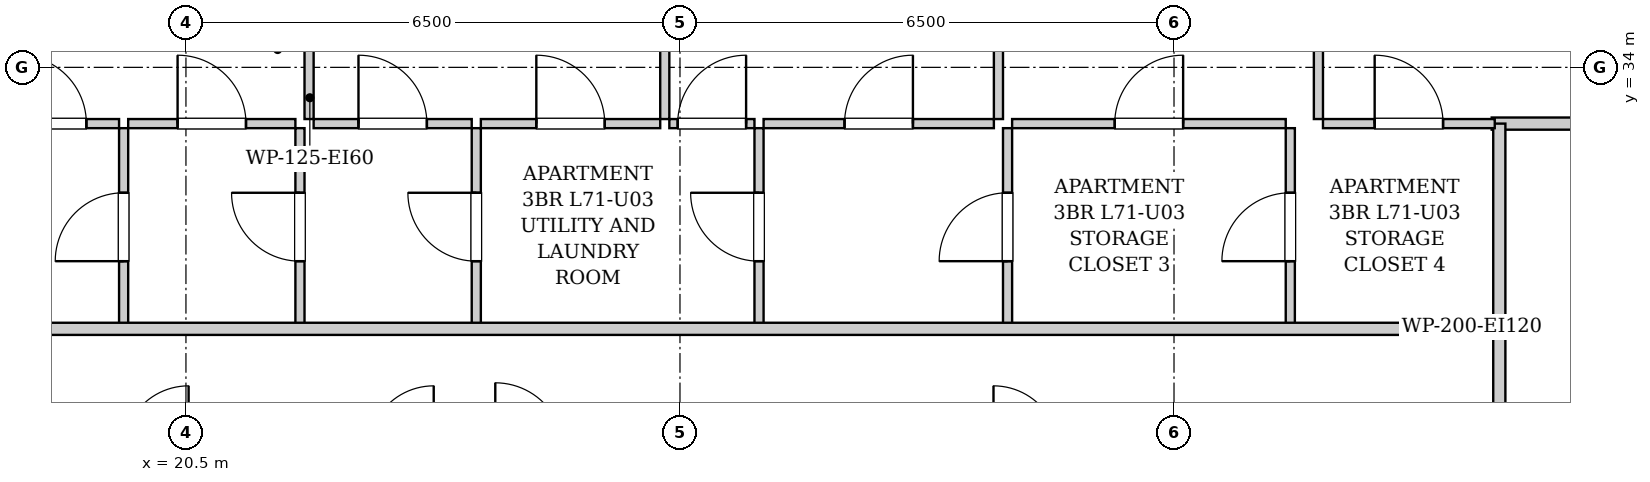
"""IFC4 building model, lengths in metres.
Left out: names, types, materials, properties, quantities, classifications, styles, units other than length and angle.
Written with IfcOpenShell. Run it as: python <this file> out.ifc"""

import sys

from ifc_helpers import new_model, si_unit, direction, frame, frame_2d, origin, place, context, subcontext, project, spatial, rectangle, extrude, element, fill, save


model = new_model("IFC4")
c1 = context("Model", 3, precision=1e-05, world=origin(), true_north=direction((0.0, 1.0)))
c2 = subcontext(c1, "Body", "Model", "MODEL_VIEW")
j1 = project(units=[si_unit("LENGTHUNIT", "METRE"), si_unit("PLANEANGLEUNIT", "RADIAN")], contexts=[c1])
p1 = place(None, origin())
s1 = spatial("IfcSite", under=j1, at=p1, CompositionType="ELEMENT")
p2 = place(p1, origin())
s2 = spatial("IfcBuilding", under=s1, at=p2, CompositionType="ELEMENT")
p3 = place(p2, frame((0.0, 0.0, 244.5)))
s3 = spatial("IfcBuildingStorey", under=s2, at=p3, CompositionType="ELEMENT", Elevation=244.5)
p4 = place(p3, frame((37.78, 28.98, 0.0), z_axis=(0.0, 0.0, 1.0), x_axis=(0.0, 1.0, 0.0)))
e1 = element("IfcWall", 1, at=p4, inside=s3, PredefinedType="PARTITIONING", context=c2, shape_type="SweptSolid", body=[
    extrude(rectangle(XDim=1.58, YDim=0.16, at=frame_2d((0.79, 0.0))), origin(), (0.0, 0.0, 1.0), 3.14),
])
p5 = place(p3, frame((37.68, 33.26, 0.0), z_axis=(0.0, 0.0, 1.0), x_axis=(1.0, 0.0, 0.0)))
e2 = element("IfcWall", 2, at=p5, inside=s3, PredefinedType="PARTITIONING", context=c2, shape_type="SweptSolid", body=[
    extrude(rectangle(XDim=2.34, YDim=0.16, at=frame_2d((1.17, 0.0))), origin(), (0.0, 0.0, 1.0), 3.14),
])
p6 = place(p3, frame((37.78, 30.6, 0.0), z_axis=(0.0, 0.0, 1.0), x_axis=(0.0, 1.0, 0.0)))
e3 = element("IfcWall", 3, at=p6, inside=s3, PredefinedType="PARTITIONING", context=c2, shape_type="SweptSolid", body=[
    extrude(rectangle(XDim=2.66, YDim=0.16, at=frame_2d((1.33, 0.0))), origin(), (0.0, 0.0, 1.0), 3.14),
])
p7 = place(p3, frame((19.68, 30.6, 0.0), z_axis=(0.0, 0.0, 1.0), x_axis=(0.0, 1.0, 0.0)))
e4 = element("IfcWall", 4, at=p7, inside=s3, PredefinedType="PARTITIONING", context=c2, shape_type="SweptSolid", body=[
    extrude(rectangle(XDim=2.6, YDim=0.12, at=frame_2d((1.3, 0.0))), origin(), (0.0, 0.0, 1.0), 3.14),
])
p8 = place(p7, frame((0.85, 0.0, 0.0)))
e5 = element("IfcOpeningElement", 5, at=p8, cuts=e4, PredefinedType="OPENING", context=c2, shape_type="SweptSolid", body=[
    extrude(rectangle(XDim=0.9, YDim=2.05, at=frame_2d((0.45, 1.025))), frame((0.0, 0.07, 0.0), z_axis=(0.0, -1.0, 0.0), x_axis=(1.0, 0.0, 0.0)), (0.0, 0.0, 1.0), 0.14),
])
p9 = place(p3, frame((17.86, 33.26, 0.0), z_axis=(0.0, 0.0, 1.0), x_axis=(1.0, 0.0, 0.0)))
e6 = element("IfcWall", 6, at=p9, inside=s3, PredefinedType="PARTITIONING", context=c2, shape_type="SweptSolid", body=[
    extrude(rectangle(XDim=1.76, YDim=0.12, at=frame_2d((0.88, 0.0))), origin(), (0.0, 0.0, 1.0), 3.14),
])
p10 = place(p9, frame((0.43, 0.0, 0.0)))
e7 = element("IfcOpeningElement", 7, at=p10, cuts=e6, PredefinedType="OPENING", context=c2, shape_type="SweptSolid", body=[
    extrude(rectangle(XDim=0.9, YDim=2.05, at=frame_2d((0.45, 1.025))), frame((0.0, 0.07, 0.0), z_axis=(0.0, -1.0, 0.0), x_axis=(1.0, 0.0, 0.0)), (0.0, 0.0, 1.0), 0.14),
])
p11 = place(p3, frame((22.0, 30.6, 0.0), z_axis=(0.0, 0.0, 1.0), x_axis=(0.0, 1.0, 0.0)))
e8 = element("IfcWall", 8, at=p11, inside=s3, PredefinedType="PARTITIONING", context=c2, shape_type="SweptSolid", body=[
    extrude(rectangle(XDim=2.6, YDim=0.12, at=frame_2d((1.3, 0.0))), origin(), (0.0, 0.0, 1.0), 3.14),
])
p12 = place(p11, frame((0.85, 0.0, 0.0)))
e9 = element("IfcOpeningElement", 9, at=p12, cuts=e8, PredefinedType="OPENING", context=c2, shape_type="SweptSolid", body=[
    extrude(rectangle(XDim=0.9, YDim=2.05, at=frame_2d((0.45, 1.025))), frame((0.0, 0.07, 0.0), z_axis=(0.0, -1.0, 0.0), x_axis=(1.0, 0.0, 0.0)), (0.0, 0.0, 1.0), 0.14),
])
p13 = place(p3, frame((19.74, 33.26, 0.0), z_axis=(0.0, 0.0, 1.0), x_axis=(1.0, 0.0, 0.0)))
e10 = element("IfcWall", 10, at=p13, inside=s3, PredefinedType="PARTITIONING", context=c2, shape_type="SweptSolid", body=[
    extrude(rectangle(XDim=2.2, YDim=0.12, at=frame_2d((1.1, 0.0))), origin(), (0.0, 0.0, 1.0), 3.14),
])
p14 = place(p13, frame((0.65, 0.0, 0.0)))
e11 = element("IfcOpeningElement", 11, at=p14, cuts=e10, PredefinedType="OPENING", context=c2, shape_type="SweptSolid", body=[
    extrude(rectangle(XDim=0.9, YDim=2.05, at=frame_2d((0.45, 1.025))), frame((0.0, 0.07, 0.0), z_axis=(0.0, -1.0, 0.0), x_axis=(1.0, 0.0, 0.0)), (0.0, 0.0, 1.0), 0.14),
])
p15 = place(p3, frame((24.32, 30.6, 0.0), z_axis=(0.0, 0.0, 1.0), x_axis=(0.0, 1.0, 0.0)))
e12 = element("IfcWall", 12, at=p15, inside=s3, PredefinedType="PARTITIONING", context=c2, shape_type="SweptSolid", body=[
    extrude(rectangle(XDim=2.6, YDim=0.12, at=frame_2d((1.3, 0.0))), origin(), (0.0, 0.0, 1.0), 3.14),
])
p16 = place(p15, frame((0.85, 0.0, 0.0)))
e13 = element("IfcOpeningElement", 13, at=p16, cuts=e12, PredefinedType="OPENING", context=c2, shape_type="SweptSolid", body=[
    extrude(rectangle(XDim=0.9, YDim=2.05, at=frame_2d((0.45, 1.025))), frame((0.0, 0.07, 0.0), z_axis=(0.0, -1.0, 0.0), x_axis=(1.0, 0.0, 0.0)), (0.0, 0.0, 1.0), 0.14),
])
p17 = place(p3, frame((22.18, 33.26, 0.0), z_axis=(0.0, 0.0, 1.0), x_axis=(1.0, 0.0, 0.0)))
e14 = element("IfcWall", 14, at=p17, inside=s3, PredefinedType="PARTITIONING", context=c2, shape_type="SweptSolid", body=[
    extrude(rectangle(XDim=2.08, YDim=0.12, at=frame_2d((1.04, 0.0))), origin(), (0.0, 0.0, 1.0), 3.14),
])
p18 = place(p17, frame((0.59, 0.0, 0.0)))
e15 = element("IfcOpeningElement", 15, at=p18, cuts=e14, PredefinedType="OPENING", context=c2, shape_type="SweptSolid", body=[
    extrude(rectangle(XDim=0.9, YDim=2.05, at=frame_2d((0.45, 1.025))), frame((0.0, 0.07, 0.0), z_axis=(0.0, -1.0, 0.0), x_axis=(1.0, 0.0, 0.0)), (0.0, 0.0, 1.0), 0.14),
])
p19 = place(p3, frame((28.04, 30.6, 0.0), z_axis=(0.0, 0.0, 1.0), x_axis=(0.0, 1.0, 0.0)))
e16 = element("IfcWall", 16, at=p19, inside=s3, PredefinedType="PARTITIONING", context=c2, shape_type="SweptSolid", body=[
    extrude(rectangle(XDim=2.6, YDim=0.12, at=frame_2d((1.3, 0.0))), origin(), (0.0, 0.0, 1.0), 3.14),
])
p20 = place(p19, frame((0.85, 0.0, 0.0)))
e17 = element("IfcOpeningElement", 17, at=p20, cuts=e16, PredefinedType="OPENING", context=c2, shape_type="SweptSolid", body=[
    extrude(rectangle(XDim=0.9, YDim=2.05, at=frame_2d((0.45, 1.025))), frame((0.0, 0.07, 0.0), z_axis=(0.0, -1.0, 0.0), x_axis=(1.0, 0.0, 0.0)), (0.0, 0.0, 1.0), 0.14),
])
p21 = place(p3, frame((24.38, 33.26, 0.0), z_axis=(0.0, 0.0, 1.0), x_axis=(1.0, 0.0, 0.0)))
e18 = element("IfcWall", 18, at=p21, inside=s3, PredefinedType="PARTITIONING", context=c2, shape_type="SweptSolid", body=[
    extrude(rectangle(XDim=2.36, YDim=0.12, at=frame_2d((1.18, 0.0))), origin(), (0.0, 0.0, 1.0), 3.14),
])
p22 = place(p21, frame((0.73, 0.0, 0.0)))
e19 = element("IfcOpeningElement", 19, at=p22, cuts=e18, PredefinedType="OPENING", context=c2, shape_type="SweptSolid", body=[
    extrude(rectangle(XDim=0.9, YDim=2.05, at=frame_2d((0.45, 1.025))), frame((0.0, 0.07, 0.0), z_axis=(0.0, -1.0, 0.0), x_axis=(1.0, 0.0, 0.0)), (0.0, 0.0, 1.0), 0.14),
])
p23 = place(p3, frame((26.86, 33.26, 0.0), z_axis=(0.0, 0.0, 1.0), x_axis=(1.0, 0.0, 0.0)))
e20 = element("IfcWall", 20, at=p23, inside=s3, PredefinedType="PARTITIONING", context=c2, shape_type="SweptSolid", body=[
    extrude(rectangle(XDim=1.12, YDim=0.12, at=frame_2d((0.56, 0.0))), origin(), (0.0, 0.0, 1.0), 3.14),
])
p24 = place(p23, frame((0.11, 0.0, 0.0)))
e21 = element("IfcOpeningElement", 21, at=p24, cuts=e20, PredefinedType="OPENING", context=c2, shape_type="SweptSolid", body=[
    extrude(rectangle(XDim=0.9, YDim=2.05, at=frame_2d((0.45, 1.025))), frame((0.0, 0.07, 0.0), z_axis=(0.0, -1.0, 0.0), x_axis=(1.0, 0.0, 0.0)), (0.0, 0.0, 1.0), 0.14),
])
p25 = place(p3, frame((31.31, 30.6, 0.0), z_axis=(0.0, 0.0, 1.0), x_axis=(0.0, 1.0, 0.0)))
e22 = element("IfcWall", 22, at=p25, inside=s3, PredefinedType="PARTITIONING", context=c2, shape_type="SweptSolid", body=[
    extrude(rectangle(XDim=2.6, YDim=0.12, at=frame_2d((1.3, 0.0))), origin(), (0.0, 0.0, 1.0), 3.14),
])
p26 = place(p25, frame((0.85, 0.0, 0.0)))
e23 = element("IfcOpeningElement", 23, at=p26, cuts=e22, PredefinedType="OPENING", context=c2, shape_type="SweptSolid", body=[
    extrude(rectangle(XDim=0.9, YDim=2.05, at=frame_2d((0.45, 1.025))), frame((0.0, 0.07, 0.0), z_axis=(0.0, -1.0, 0.0), x_axis=(1.0, 0.0, 0.0)), (0.0, 0.0, 1.0), 0.14),
])
p27 = place(p3, frame((28.1, 33.26, 0.0), z_axis=(0.0, 0.0, 1.0), x_axis=(1.0, 0.0, 0.0)))
e24 = element("IfcWall", 24, at=p27, inside=s3, PredefinedType="PARTITIONING", context=c2, shape_type="SweptSolid", body=[
    extrude(rectangle(XDim=3.03, YDim=0.12, at=frame_2d((1.515, 0.0))), origin(), (0.0, 0.0, 1.0), 3.14),
])
p28 = place(p27, frame((1.065, 0.0, 0.0)))
e25 = element("IfcOpeningElement", 25, at=p28, cuts=e24, PredefinedType="OPENING", context=c2, shape_type="SweptSolid", body=[
    extrude(rectangle(XDim=0.9, YDim=2.05, at=frame_2d((0.45, 1.025))), frame((0.0, 0.07, 0.0), z_axis=(0.0, -1.0, 0.0), x_axis=(1.0, 0.0, 0.0)), (0.0, 0.0, 1.0), 0.14),
])
p29 = place(p3, frame((35.03, 30.6, 0.0), z_axis=(0.0, 0.0, 1.0), x_axis=(0.0, 1.0, 0.0)))
e26 = element("IfcWall", 26, at=p29, inside=s3, PredefinedType="PARTITIONING", context=c2, shape_type="SweptSolid", body=[
    extrude(rectangle(XDim=2.6, YDim=0.12, at=frame_2d((1.3, 0.0))), origin(), (0.0, 0.0, 1.0), 3.14),
])
p30 = place(p29, frame((0.85, 0.0, 0.0)))
e27 = element("IfcOpeningElement", 27, at=p30, cuts=e26, PredefinedType="OPENING", context=c2, shape_type="SweptSolid", body=[
    extrude(rectangle(XDim=0.9, YDim=2.05, at=frame_2d((0.45, 1.025))), frame((0.0, 0.07, 0.0), z_axis=(0.0, -1.0, 0.0), x_axis=(1.0, 0.0, 0.0)), (0.0, 0.0, 1.0), 0.14),
])
p31 = place(p3, frame((31.37, 33.26, 0.0), z_axis=(0.0, 0.0, 1.0), x_axis=(1.0, 0.0, 0.0)))
e28 = element("IfcWall", 28, at=p31, inside=s3, PredefinedType="PARTITIONING", context=c2, shape_type="SweptSolid", body=[
    extrude(rectangle(XDim=3.6, YDim=0.12, at=frame_2d((1.8, 0.0))), origin(), (0.0, 0.0, 1.0), 3.14),
])
p32 = place(p31, frame((1.35, 0.0, 0.0)))
e29 = element("IfcOpeningElement", 29, at=p32, cuts=e28, PredefinedType="OPENING", context=c2, shape_type="SweptSolid", body=[
    extrude(rectangle(XDim=0.9, YDim=2.05, at=frame_2d((0.45, 1.025))), frame((0.0, 0.07, 0.0), z_axis=(0.0, -1.0, 0.0), x_axis=(1.0, 0.0, 0.0)), (0.0, 0.0, 1.0), 0.14),
])
p33 = place(p3, frame((35.46, 33.26, 0.0), z_axis=(0.0, 0.0, 1.0), x_axis=(1.0, 0.0, 0.0)))
e30 = element("IfcWall", 30, at=p33, inside=s3, PredefinedType="PARTITIONING", context=c2, shape_type="SweptSolid", body=[
    extrude(rectangle(XDim=2.26, YDim=0.12, at=frame_2d((1.13, 0.0))), origin(), (0.0, 0.0, 1.0), 3.14),
])
p34 = place(p33, frame((0.68, 0.0, 0.0)))
e31 = element("IfcOpeningElement", 31, at=p34, cuts=e30, PredefinedType="OPENING", context=c2, shape_type="SweptSolid", body=[
    extrude(rectangle(XDim=0.9, YDim=2.05, at=frame_2d((0.45, 1.025))), frame((0.0, 0.07, 0.0), z_axis=(0.0, -1.0, 0.0), x_axis=(1.0, 0.0, 0.0)), (0.0, 0.0, 1.0), 0.14),
])
p35 = place(p3, frame((22.12, 33.32, 0.0), z_axis=(0.0, 0.0, 1.0), x_axis=(0.0, 1.0, 0.0)))
e32 = element("IfcWall", 32, at=p35, inside=s3, PredefinedType="PARTITIONING", context=c2, shape_type="SweptSolid", body=[
    extrude(rectangle(XDim=6.6, YDim=0.12, at=frame_2d((3.3, 0.0))), origin(), (0.0, 0.0, 1.0), 3.14),
])
p36 = place(p35, frame((2.835, 0.0, 0.0)))
e33 = element("IfcOpeningElement", 33, at=p36, cuts=e32, PredefinedType="OPENING", context=c2, shape_type="SweptSolid", body=[
    extrude(rectangle(XDim=0.9, YDim=2.05, at=frame_2d((0.45, 1.025))), frame((0.0, 0.07, 0.0), z_axis=(0.0, -1.0, 0.0), x_axis=(1.0, 0.0, 0.0)), (0.0, 0.0, 1.0), 0.14),
])
p37 = place(p3, frame((26.8, 33.32, 0.0), z_axis=(0.0, 0.0, 1.0), x_axis=(0.0, 1.0, 0.0)))
e34 = element("IfcWall", 34, at=p37, inside=s3, PredefinedType="PARTITIONING", context=c2, shape_type="SweptSolid", body=[
    extrude(rectangle(XDim=6.6, YDim=0.12, at=frame_2d((3.3, 0.0))), origin(), (0.0, 0.0, 1.0), 3.14),
])
p38 = place(p37, frame((2.835, 0.0, 0.0)))
e35 = element("IfcOpeningElement", 35, at=p38, cuts=e34, PredefinedType="OPENING", context=c2, shape_type="SweptSolid", body=[
    extrude(rectangle(XDim=0.9, YDim=2.05, at=frame_2d((0.45, 1.025))), frame((0.0, 0.07, 0.0), z_axis=(0.0, -1.0, 0.0), x_axis=(1.0, 0.0, 0.0)), (0.0, 0.0, 1.0), 0.14),
])
p39 = place(p3, frame((31.19, 33.32, 0.0), z_axis=(0.0, 0.0, 1.0), x_axis=(0.0, 1.0, 0.0)))
e36 = element("IfcWall", 36, at=p39, inside=s3, PredefinedType="PARTITIONING", context=c2, shape_type="SweptSolid", body=[
    extrude(rectangle(XDim=4.45, YDim=0.12, at=frame_2d((2.225, 0.0))), origin(), (0.0, 0.0, 1.0), 3.14),
])
p40 = place(p39, frame((1.775, 0.0, 0.0)))
e37 = element("IfcOpeningElement", 37, at=p40, cuts=e36, PredefinedType="OPENING", context=c2, shape_type="SweptSolid", body=[
    extrude(rectangle(XDim=0.9, YDim=2.05, at=frame_2d((0.45, 1.025))), frame((0.0, 0.07, 0.0), z_axis=(0.0, -1.0, 0.0), x_axis=(1.0, 0.0, 0.0)), (0.0, 0.0, 1.0), 0.14),
])
p41 = place(p3, frame((35.4, 33.32, 0.0), z_axis=(0.0, 0.0, 1.0), x_axis=(0.0, 1.0, 0.0)))
e38 = element("IfcWall", 38, at=p41, inside=s3, PredefinedType="PARTITIONING", context=c2, shape_type="SweptSolid", body=[
    extrude(rectangle(XDim=4.45, YDim=0.12, at=frame_2d((2.225, 0.0))), origin(), (0.0, 0.0, 1.0), 3.14),
])
p42 = place(p41, frame((1.775, 0.0, 0.0)))
e39 = element("IfcOpeningElement", 39, at=p42, cuts=e38, PredefinedType="OPENING", context=c2, shape_type="SweptSolid", body=[
    extrude(rectangle(XDim=0.9, YDim=2.05, at=frame_2d((0.45, 1.025))), frame((0.0, 0.07, 0.0), z_axis=(0.0, -1.0, 0.0), x_axis=(1.0, 0.0, 0.0)), (0.0, 0.0, 1.0), 0.14),
])
p43 = place(p3, frame((13.15, 30.56, 0.0), z_axis=(0.0, 0.0, 1.0), x_axis=(1.0, 0.0, 0.0)))
e40 = element("IfcWall", 40, at=p43, inside=s3, PredefinedType="PARTITIONING", context=c2, shape_type="SweptSolid", body=[
    extrude(rectangle(XDim=24.6, YDim=0.16, at=frame_2d((12.3, 0.0))), origin(), (0.0, 0.0, 1.0), 3.14),
])
p44 = place(p43, frame((3.165, 0.0, 0.0)))
e41 = element("IfcOpeningElement", 41, at=p44, cuts=e40, PredefinedType="OPENING", context=c2, shape_type="SweptSolid", body=[
    extrude(rectangle(XDim=0.95, YDim=2.1, at=frame_2d((0.475, 1.05))), frame((0.0, 0.09, 0.0), z_axis=(0.0, -1.0, 0.0), x_axis=(1.0, 0.0, 0.0)), (0.0, 0.0, 1.0), 0.18),
])
p45 = place(p8, origin())
e42 = element("IfcDoor", 42, at=p45, inside=s3, OperationType="SINGLE_SWING_LEFT", PredefinedType="DOOR", context=c2, shape_type="SweptSolid", body=[
    extrude(rectangle(XDim=0.9, YDim=2.05, at=frame_2d((0.45, 1.025))), frame((0.0, 0.025, 0.0), z_axis=(0.0, -1.0, 0.0), x_axis=(1.0, 0.0, 0.0)), (0.0, 0.0, 1.0), 0.05),
])
fill(e5, e42)
p46 = place(p10, origin())
e43 = element("IfcDoor", 43, at=p46, inside=s3, OperationType="SINGLE_SWING_LEFT", PredefinedType="DOOR", context=c2, shape_type="SweptSolid", body=[
    extrude(rectangle(XDim=0.9, YDim=2.05, at=frame_2d((0.45, 1.025))), frame((0.0, 0.025, 0.0), z_axis=(0.0, -1.0, 0.0), x_axis=(1.0, 0.0, 0.0)), (0.0, 0.0, 1.0), 0.05),
])
fill(e7, e43)
p47 = place(p12, origin())
e44 = element("IfcDoor", 44, at=p47, inside=s3, OperationType="SINGLE_SWING_RIGHT", PredefinedType="DOOR", context=c2, shape_type="SweptSolid", body=[
    extrude(rectangle(XDim=0.9, YDim=2.05, at=frame_2d((0.45, 1.025))), frame((0.0, 0.025, 0.0), z_axis=(0.0, -1.0, 0.0), x_axis=(1.0, 0.0, 0.0)), (0.0, 0.0, 1.0), 0.05),
])
fill(e9, e44)
p48 = place(p14, origin())
e45 = element("IfcDoor", 45, at=p48, inside=s3, OperationType="SINGLE_SWING_LEFT", PredefinedType="DOOR", context=c2, shape_type="SweptSolid", body=[
    extrude(rectangle(XDim=0.9, YDim=2.05, at=frame_2d((0.45, 1.025))), frame((0.0, 0.025, 0.0), z_axis=(0.0, -1.0, 0.0), x_axis=(1.0, 0.0, 0.0)), (0.0, 0.0, 1.0), 0.05),
])
fill(e11, e45)
p49 = place(p16, origin())
e46 = element("IfcDoor", 46, at=p49, inside=s3, OperationType="SINGLE_SWING_RIGHT", PredefinedType="DOOR", context=c2, shape_type="SweptSolid", body=[
    extrude(rectangle(XDim=0.9, YDim=2.05, at=frame_2d((0.45, 1.025))), frame((0.0, 0.025, 0.0), z_axis=(0.0, -1.0, 0.0), x_axis=(1.0, 0.0, 0.0)), (0.0, 0.0, 1.0), 0.05),
])
fill(e13, e46)
p50 = place(p18, origin())
e47 = element("IfcDoor", 47, at=p50, inside=s3, OperationType="SINGLE_SWING_LEFT", PredefinedType="DOOR", context=c2, shape_type="SweptSolid", body=[
    extrude(rectangle(XDim=0.9, YDim=2.05, at=frame_2d((0.45, 1.025))), frame((0.0, 0.025, 0.0), z_axis=(0.0, -1.0, 0.0), x_axis=(1.0, 0.0, 0.0)), (0.0, 0.0, 1.0), 0.05),
])
fill(e15, e47)
p51 = place(p20, origin())
e48 = element("IfcDoor", 48, at=p51, inside=s3, OperationType="SINGLE_SWING_RIGHT", PredefinedType="DOOR", context=c2, shape_type="SweptSolid", body=[
    extrude(rectangle(XDim=0.9, YDim=2.05, at=frame_2d((0.45, 1.025))), frame((0.0, 0.025, 0.0), z_axis=(0.0, -1.0, 0.0), x_axis=(1.0, 0.0, 0.0)), (0.0, 0.0, 1.0), 0.05),
])
fill(e17, e48)
p52 = place(p22, origin())
e49 = element("IfcDoor", 49, at=p52, inside=s3, OperationType="SINGLE_SWING_LEFT", PredefinedType="DOOR", context=c2, shape_type="SweptSolid", body=[
    extrude(rectangle(XDim=0.9, YDim=2.05, at=frame_2d((0.45, 1.025))), frame((0.0, 0.025, 0.0), z_axis=(0.0, -1.0, 0.0), x_axis=(1.0, 0.0, 0.0)), (0.0, 0.0, 1.0), 0.05),
])
fill(e19, e49)
p53 = place(p24, origin())
e50 = element("IfcDoor", 50, at=p53, inside=s3, OperationType="SINGLE_SWING_RIGHT", PredefinedType="DOOR", context=c2, shape_type="SweptSolid", body=[
    extrude(rectangle(XDim=0.9, YDim=2.05, at=frame_2d((0.45, 1.025))), frame((0.0, 0.025, 0.0), z_axis=(0.0, -1.0, 0.0), x_axis=(1.0, 0.0, 0.0)), (0.0, 0.0, 1.0), 0.05),
])
fill(e21, e50)
p54 = place(p26, origin())
e51 = element("IfcDoor", 51, at=p54, inside=s3, OperationType="SINGLE_SWING_LEFT", PredefinedType="DOOR", context=c2, shape_type="SweptSolid", body=[
    extrude(rectangle(XDim=0.9, YDim=2.05, at=frame_2d((0.45, 1.025))), frame((0.0, 0.025, 0.0), z_axis=(0.0, -1.0, 0.0), x_axis=(1.0, 0.0, 0.0)), (0.0, 0.0, 1.0), 0.05),
])
fill(e23, e51)
p55 = place(p28, origin())
e52 = element("IfcDoor", 52, at=p55, inside=s3, OperationType="SINGLE_SWING_RIGHT", PredefinedType="DOOR", context=c2, shape_type="SweptSolid", body=[
    extrude(rectangle(XDim=0.9, YDim=2.05, at=frame_2d((0.45, 1.025))), frame((0.0, 0.025, 0.0), z_axis=(0.0, -1.0, 0.0), x_axis=(1.0, 0.0, 0.0)), (0.0, 0.0, 1.0), 0.05),
])
fill(e25, e52)
p56 = place(p30, origin())
e53 = element("IfcDoor", 53, at=p56, inside=s3, OperationType="SINGLE_SWING_LEFT", PredefinedType="DOOR", context=c2, shape_type="SweptSolid", body=[
    extrude(rectangle(XDim=0.9, YDim=2.05, at=frame_2d((0.45, 1.025))), frame((0.0, 0.025, 0.0), z_axis=(0.0, -1.0, 0.0), x_axis=(1.0, 0.0, 0.0)), (0.0, 0.0, 1.0), 0.05),
])
fill(e27, e53)
p57 = place(p32, origin())
e54 = element("IfcDoor", 54, at=p57, inside=s3, OperationType="SINGLE_SWING_RIGHT", PredefinedType="DOOR", context=c2, shape_type="SweptSolid", body=[
    extrude(rectangle(XDim=0.9, YDim=2.05, at=frame_2d((0.45, 1.025))), frame((0.0, 0.025, 0.0), z_axis=(0.0, -1.0, 0.0), x_axis=(1.0, 0.0, 0.0)), (0.0, 0.0, 1.0), 0.05),
])
fill(e29, e54)
p58 = place(p34, origin())
e55 = element("IfcDoor", 55, at=p58, inside=s3, OperationType="SINGLE_SWING_LEFT", PredefinedType="DOOR", context=c2, shape_type="SweptSolid", body=[
    extrude(rectangle(XDim=0.9, YDim=2.05, at=frame_2d((0.45, 1.025))), frame((0.0, 0.025, 0.0), z_axis=(0.0, -1.0, 0.0), x_axis=(1.0, 0.0, 0.0)), (0.0, 0.0, 1.0), 0.05),
])
fill(e31, e55)
save(model, sys.argv[1])
